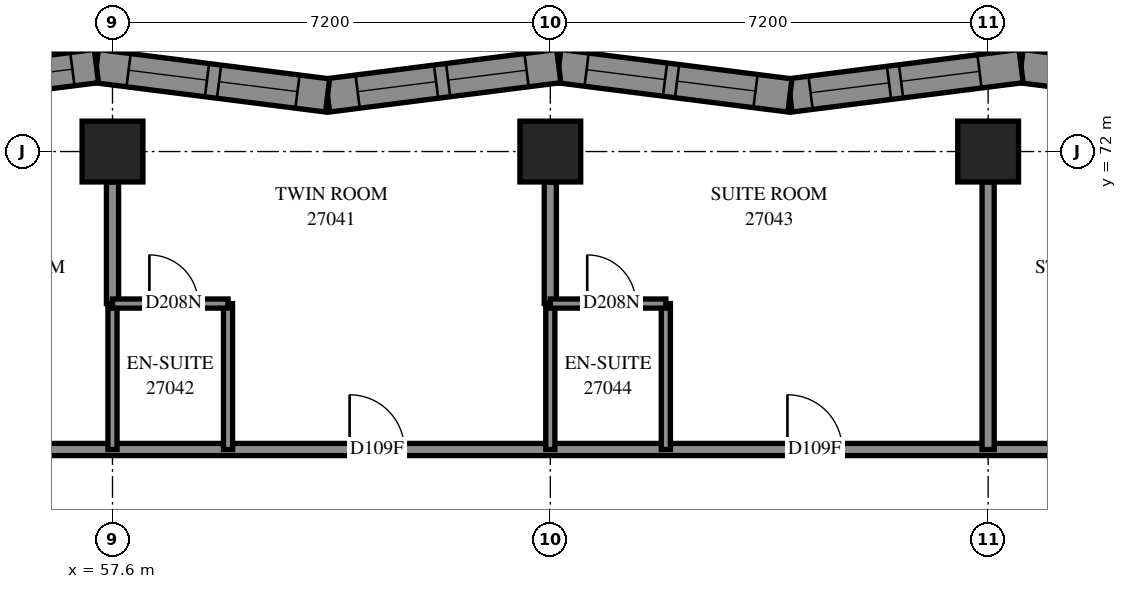
"""IFC4 building model, lengths in metres.
Left out: names, types, materials, properties, quantities, classifications, styles, units other than length and angle.
Written with IfcOpenShell. Run it as: python <this file> out.ifc"""

import sys

from ifc_helpers import new_model, si_unit, direction, frame, frame_2d, origin, origin_2d, place, context, subcontext, project, spatial, polyline, rectangle, outline, extrude, element, fill, save


model = new_model("IFC4")
c1 = context("Model", 3, precision=1e-05, world=origin(), true_north=direction((0.0, 1.0)))
c2 = subcontext(c1, "Body", "Model", "MODEL_VIEW")
j1 = project(units=[si_unit("LENGTHUNIT", "METRE"), si_unit("PLANEANGLEUNIT", "RADIAN")], contexts=[c1])
p1 = place(None, origin())
s1 = spatial("IfcSite", under=j1, at=p1, CompositionType="ELEMENT")
p2 = place(p1, origin())
s2 = spatial("IfcBuilding", under=s1, at=p2, CompositionType="ELEMENT")
p3 = place(p2, frame((0.0, 0.0, 101.6)))
s3 = spatial("IfcBuildingStorey", under=s2, at=p3, CompositionType="ELEMENT", Elevation=101.6)
for number, where, z_axis, x_axis in (
    (1, (57.6, 72.0, 0.0), (0.0, 0.0, 1.0), (1.0, 0.0, 0.0)),
    (2, (64.8, 72.0, 0.0), (0.0, 0.0, 1.0), (1.0, 0.0, 0.0)),
    (3, (72.0, 72.0, 0.0), (0.0, 0.0, 1.0), (1.0, 0.0, 0.0)),
):
    element("IfcColumn", number, at=place(p3, frame(where, z_axis=z_axis, x_axis=x_axis)), inside=s3, PredefinedType="COLUMN", context=c2, shape_type="SweptSolid", body=[
        extrude(rectangle(XDim=1.0, YDim=1.0, at=origin_2d()), origin(), (0.0, 0.0, 1.0), 3.1),
    ])
p4 = place(p3, frame((76.365, 72.92, 0.0), z_axis=(0.0, 0.0, 1.0), x_axis=(-0.9920579561, 0.1257816033, 0.0)))
e4 = element("IfcWall", 4, at=p4, inside=s3, PredefinedType="SOLIDWALL", context=c2, shape_type="SweptSolid", body=[
    extrude(outline(polyline([(0.056, -0.275), (3.888, -0.275), (3.819, 0.275), (-0.056, 0.275), (0.056, -0.275)])), origin(), (0.0, 0.0, 1.0), 3.1),
])
p5 = place(p4, frame((1.595, 0.0, 0.5)))
e5 = element("IfcOpeningElement", 5, at=p5, cuts=e4, PredefinedType="OPENING", context=c2, shape_type="SweptSolid", body=[
    extrude(rectangle(XDim=1.2, YDim=2.45, at=frame_2d((0.6, 1.225))), frame((0.0, 0.285, 0.0), z_axis=(0.0, -1.0, 0.0), x_axis=(1.0, 0.0, 0.0)), (0.0, 0.0, 1.0), 0.57),
])
p6 = place(p3, frame((72.542, 73.405, 0.0), z_axis=(0.0, 0.0, 1.0), x_axis=(-0.9920583495, -0.1257785003, 0.0)))
e6 = element("IfcWall", 6, at=p6, inside=s3, PredefinedType="SOLIDWALL", context=c2, shape_type="SweptSolid", body=[
    extrude(outline(polyline([(-0.035, -0.275), (3.797, -0.275), (3.867, 0.275), (0.035, 0.275), (-0.035, -0.275)])), origin(), (0.0, 0.0, 1.0), 3.1),
])
p7 = place(p6, frame((0.689, 0.0, 0.5)))
e7 = element("IfcOpeningElement", 7, at=p7, cuts=e6, PredefinedType="OPENING", context=c2, shape_type="SweptSolid", body=[
    extrude(rectangle(XDim=1.3, YDim=2.45, at=frame_2d((0.65, 1.225))), frame((0.0, 0.285, 0.0), z_axis=(0.0, -1.0, 0.0), x_axis=(1.0, 0.0, 0.0)), (0.0, 0.0, 1.0), 0.57),
])
p8 = place(p6, frame((2.189, 0.0, 0.5)))
e8 = element("IfcOpeningElement", 8, at=p8, cuts=e6, PredefinedType="OPENING", context=c2, shape_type="SweptSolid", body=[
    extrude(rectangle(XDim=1.3, YDim=2.45, at=frame_2d((0.65, 1.225))), frame((0.0, 0.285, 0.0), z_axis=(0.0, -1.0, 0.0), x_axis=(1.0, 0.0, 0.0)), (0.0, 0.0, 1.0), 0.57),
])
p9 = place(p3, frame((68.74, 72.923, 0.0), z_axis=(0.0, 0.0, 1.0), x_axis=(-0.9920583495, 0.1257785003, 0.0)))
e9 = element("IfcWall", 9, at=p9, inside=s3, PredefinedType="SOLIDWALL", context=c2, shape_type="SweptSolid", body=[
    extrude(outline(polyline([(0.035, -0.275), (3.867, -0.275), (3.797, 0.275), (-0.035, 0.275), (0.035, -0.275)])), origin(), (0.0, 0.0, 1.0), 3.1),
])
p10 = place(p9, frame((0.57, 0.0, 0.5)))
e10 = element("IfcOpeningElement", 10, at=p10, cuts=e9, PredefinedType="OPENING", context=c2, shape_type="SweptSolid", body=[
    extrude(rectangle(XDim=1.3, YDim=2.45, at=frame_2d((0.65, 1.225))), frame((0.0, 0.285, 0.0), z_axis=(0.0, -1.0, 0.0), x_axis=(1.0, 0.0, 0.0)), (0.0, 0.0, 1.0), 0.57),
])
p11 = place(p9, frame((2.07, 0.0, 0.5)))
e11 = element("IfcOpeningElement", 11, at=p11, cuts=e9, PredefinedType="OPENING", context=c2, shape_type="SweptSolid", body=[
    extrude(rectangle(XDim=1.3, YDim=2.45, at=frame_2d((0.65, 1.225))), frame((0.0, 0.285, 0.0), z_axis=(0.0, -1.0, 0.0), x_axis=(1.0, 0.0, 0.0)), (0.0, 0.0, 1.0), 0.57),
])
p12 = place(p3, frame((64.939, 73.405, 0.0), z_axis=(0.0, 0.0, 1.0), x_axis=(-0.9920583495, -0.1257785003, 0.0)))
e12 = element("IfcWall", 12, at=p12, inside=s3, PredefinedType="SOLIDWALL", context=c2, shape_type="SweptSolid", body=[
    extrude(outline(polyline([(-0.035, -0.275), (3.797, -0.275), (3.867, 0.275), (0.035, 0.275), (-0.035, -0.275)])), origin(), (0.0, 0.0, 1.0), 3.1),
])
p13 = place(p12, frame((0.533, 0.0, 0.5)))
e13 = element("IfcOpeningElement", 13, at=p13, cuts=e12, PredefinedType="OPENING", context=c2, shape_type="SweptSolid", body=[
    extrude(rectangle(XDim=1.3, YDim=2.45, at=frame_2d((0.65, 1.225))), frame((0.0, 0.285, 0.0), z_axis=(0.0, -1.0, 0.0), x_axis=(1.0, 0.0, 0.0)), (0.0, 0.0, 1.0), 0.57),
])
p14 = place(p12, frame((2.034, 0.0, 0.5)))
e14 = element("IfcOpeningElement", 14, at=p14, cuts=e12, PredefinedType="OPENING", context=c2, shape_type="SweptSolid", body=[
    extrude(rectangle(XDim=1.3, YDim=2.45, at=frame_2d((0.65, 1.225))), frame((0.0, 0.285, 0.0), z_axis=(0.0, -1.0, 0.0), x_axis=(1.0, 0.0, 0.0)), (0.0, 0.0, 1.0), 0.57),
])
p15 = place(p3, frame((61.137, 72.923, 0.0), z_axis=(0.0, 0.0, 1.0), x_axis=(-0.9920583495, 0.1257785003, 0.0)))
e15 = element("IfcWall", 15, at=p15, inside=s3, PredefinedType="SOLIDWALL", context=c2, shape_type="SweptSolid", body=[
    extrude(outline(polyline([(0.035, -0.275), (3.867, -0.275), (3.797, 0.275), (-0.035, 0.275), (0.035, -0.275)])), origin(), (0.0, 0.0, 1.0), 3.1),
])
p16 = place(p15, frame((0.499, 0.0, 0.5)))
e16 = element("IfcOpeningElement", 16, at=p16, cuts=e15, PredefinedType="OPENING", context=c2, shape_type="SweptSolid", body=[
    extrude(rectangle(XDim=1.3, YDim=2.45, at=frame_2d((0.65, 1.225))), frame((0.0, 0.285, 0.0), z_axis=(0.0, -1.0, 0.0), x_axis=(1.0, 0.0, 0.0)), (0.0, 0.0, 1.0), 0.57),
])
p17 = place(p15, frame((1.999, 0.0, 0.5)))
e17 = element("IfcOpeningElement", 17, at=p17, cuts=e15, PredefinedType="OPENING", context=c2, shape_type="SweptSolid", body=[
    extrude(rectangle(XDim=1.3, YDim=2.45, at=frame_2d((0.65, 1.225))), frame((0.0, 0.285, 0.0), z_axis=(0.0, -1.0, 0.0), x_axis=(1.0, 0.0, 0.0)), (0.0, 0.0, 1.0), 0.57),
])
p18 = place(p3, frame((57.335, 73.405, 0.0), z_axis=(0.0, 0.0, 1.0), x_axis=(-0.9920587623, -0.1257752442, 0.0)))
e18 = element("IfcWall", 18, at=p18, inside=s3, PredefinedType="SOLIDWALL", context=c2, shape_type="SweptSolid", body=[
    extrude(outline(polyline([(-0.035, -0.275), (3.797, -0.275), (3.867, 0.275), (0.035, 0.275), (-0.035, -0.275)])), origin(), (0.0, 0.0, 1.0), 3.1),
])
p19 = place(p18, frame((0.398, 0.0, 0.5)))
e19 = element("IfcOpeningElement", 19, at=p19, cuts=e18, PredefinedType="OPENING", context=c2, shape_type="SweptSolid", body=[
    extrude(rectangle(XDim=1.3, YDim=2.45, at=frame_2d((0.65, 1.225))), frame((0.0, 0.285, 0.0), z_axis=(0.0, -1.0, 0.0), x_axis=(1.0, 0.0, 0.0)), (0.0, 0.0, 1.0), 0.57),
])
p20 = place(p18, frame((1.898, 0.0, 0.5)))
e20 = element("IfcOpeningElement", 20, at=p20, cuts=e18, PredefinedType="OPENING", context=c2, shape_type="SweptSolid", body=[
    extrude(rectangle(XDim=1.3, YDim=2.45, at=frame_2d((0.65, 1.225))), frame((0.0, 0.285, 0.0), z_axis=(0.0, -1.0, 0.0), x_axis=(1.0, 0.0, 0.0)), (0.0, 0.0, 1.0), 0.57),
])
p21 = place(p3, frame((55.3, 67.1, 0.0), z_axis=(0.0, 0.0, 1.0), x_axis=(1.0, 0.0, 0.0)))
e21 = element("IfcWall", 21, at=p21, inside=s3, PredefinedType="PARTITIONING", context=c2, shape_type="SweptSolid", body=[
    extrude(rectangle(XDim=19.0, YDim=0.2, at=frame_2d((9.5, 0.0))), origin(), (0.0, 0.0, 1.0), 3.1),
])
p22 = place(p21, frame((6.199, 0.0, 0.0)))
e22 = element("IfcOpeningElement", 22, at=p22, cuts=e21, PredefinedType="OPENING", context=c2, shape_type="SweptSolid", body=[
    extrude(rectangle(XDim=0.9, YDim=2.1, at=frame_2d((0.45, 1.05))), frame((0.0, 0.11, 0.0), z_axis=(0.0, -1.0, 0.0), x_axis=(1.0, 0.0, 0.0)), (0.0, 0.0, 1.0), 0.22),
])
p23 = place(p21, frame((13.399, 0.0, 0.0)))
e23 = element("IfcOpeningElement", 23, at=p23, cuts=e21, PredefinedType="OPENING", context=c2, shape_type="SweptSolid", body=[
    extrude(rectangle(XDim=0.9, YDim=2.1, at=frame_2d((0.45, 1.05))), frame((0.0, 0.11, 0.0), z_axis=(0.0, -1.0, 0.0), x_axis=(1.0, 0.0, 0.0)), (0.0, 0.0, 1.0), 0.22),
])
p24 = place(p3, frame((72.0, 67.1, 0.0), z_axis=(0.0, 0.0, 1.0), x_axis=(0.0, 1.0, 0.0)))
e24 = element("IfcWall", 24, at=p24, inside=s3, PredefinedType="PARTITIONING", context=c2, shape_type="SweptSolid", body=[
    extrude(rectangle(XDim=4.4, YDim=0.2, at=frame_2d((2.2, 0.0))), origin(), (0.0, 0.0, 1.0), 3.1),
])
for number, where, z_axis, x_axis in (
    (25, (59.5, 67.1, 0.0), (0.0, 0.0, 1.0), (0.0, 1.0, 0.0)),
    (26, (57.6, 67.1, 0.0), (0.0, 0.0, 1.0), (0.0, 1.0, 0.0)),
    (27, (64.8, 67.1, 0.0), (0.0, 0.0, 1.0), (0.0, 1.0, 0.0)),
    (28, (66.7, 67.1, 0.0), (0.0, 0.0, 1.0), (0.0, 1.0, 0.0)),
):
    element("IfcWall", number, at=place(p3, frame(where, z_axis=z_axis, x_axis=x_axis)), inside=s3, PredefinedType="PARTITIONING", context=c2, shape_type="SweptSolid", body=[
        extrude(rectangle(XDim=2.4, YDim=0.15, at=frame_2d((1.2, 0.0))), origin(), (0.0, 0.0, 1.0), 3.1),
    ])
for number, where, z_axis, x_axis in (
    (29, (57.6, 69.5, 0.0), (0.0, 0.0, 1.0), (0.0, 1.0, 0.0)),
    (30, (64.8, 69.5, 0.0), (0.0, 0.0, 1.0), (0.0, 1.0, 0.0)),
):
    element("IfcWall", number, at=place(p3, frame(where, z_axis=z_axis, x_axis=x_axis)), inside=s3, PredefinedType="PARTITIONING", context=c2, shape_type="SweptSolid", body=[
        extrude(rectangle(XDim=2.0, YDim=0.2, at=frame_2d((1.0, 0.0))), origin(), (0.0, 0.0, 1.0), 3.1),
    ])
p25 = place(p3, frame((64.8, 69.5, 0.0), z_axis=(0.0, 0.0, 1.0), x_axis=(1.0, 0.0, 0.0)))
e31 = element("IfcWall", 31, at=p25, inside=s3, PredefinedType="PARTITIONING", context=c2, shape_type="SweptSolid", body=[
    extrude(rectangle(XDim=1.9, YDim=0.15, at=frame_2d((0.95, 0.0))), origin(), (0.0, 0.0, 1.0), 3.1),
])
p26 = place(p25, frame((0.607, 0.0, 0.0)))
e32 = element("IfcOpeningElement", 32, at=p26, cuts=e31, PredefinedType="OPENING", context=c2, shape_type="SweptSolid", body=[
    extrude(rectangle(XDim=0.8, YDim=2.1, at=frame_2d((0.4, 1.05))), frame((0.0, 0.085, 0.0), z_axis=(0.0, -1.0, 0.0), x_axis=(1.0, 0.0, 0.0)), (0.0, 0.0, 1.0), 0.17),
])
p27 = place(p3, frame((57.6, 69.5, 0.0), z_axis=(0.0, 0.0, 1.0), x_axis=(1.0, 0.0, 0.0)))
e33 = element("IfcWall", 33, at=p27, inside=s3, PredefinedType="PARTITIONING", context=c2, shape_type="SweptSolid", body=[
    extrude(rectangle(XDim=1.9, YDim=0.15, at=frame_2d((0.95, 0.0))), origin(), (0.0, 0.0, 1.0), 3.1),
])
p28 = place(p27, frame((0.607, 0.0, 0.0)))
e34 = element("IfcOpeningElement", 34, at=p28, cuts=e33, PredefinedType="OPENING", context=c2, shape_type="SweptSolid", body=[
    extrude(rectangle(XDim=0.8, YDim=2.1, at=frame_2d((0.4, 1.05))), frame((0.0, 0.085, 0.0), z_axis=(0.0, -1.0, 0.0), x_axis=(1.0, 0.0, 0.0)), (0.0, 0.0, 1.0), 0.17),
])
p29 = place(p7, origin())
e35 = element("IfcWindow", 35, at=p29, inside=s3, PartitioningType="SINGLE_PANEL", PredefinedType="WINDOW", context=c2, shape_type="SweptSolid", body=[
    extrude(rectangle(XDim=1.3, YDim=2.45, at=frame_2d((0.65, 1.225))), frame((0.0, 0.155, 0.0), z_axis=(0.0, -1.0, 0.0), x_axis=(1.0, 0.0, 0.0)), (0.0, 0.0, 1.0), 0.06),
])
fill(e7, e35)
p30 = place(p8, origin())
e36 = element("IfcWindow", 36, at=p30, inside=s3, PartitioningType="SINGLE_PANEL", PredefinedType="WINDOW", context=c2, shape_type="SweptSolid", body=[
    extrude(rectangle(XDim=1.3, YDim=2.45, at=frame_2d((0.65, 1.225))), frame((0.0, 0.155, 0.0), z_axis=(0.0, -1.0, 0.0), x_axis=(1.0, 0.0, 0.0)), (0.0, 0.0, 1.0), 0.06),
])
fill(e8, e36)
p31 = place(p10, origin())
e37 = element("IfcWindow", 37, at=p31, inside=s3, PartitioningType="SINGLE_PANEL", PredefinedType="WINDOW", context=c2, shape_type="SweptSolid", body=[
    extrude(rectangle(XDim=1.3, YDim=2.45, at=frame_2d((0.65, 1.225))), frame((0.0, 0.155, 0.0), z_axis=(0.0, -1.0, 0.0), x_axis=(1.0, 0.0, 0.0)), (0.0, 0.0, 1.0), 0.06),
])
fill(e10, e37)
p32 = place(p11, origin())
e38 = element("IfcWindow", 38, at=p32, inside=s3, PartitioningType="SINGLE_PANEL", PredefinedType="WINDOW", context=c2, shape_type="SweptSolid", body=[
    extrude(rectangle(XDim=1.3, YDim=2.45, at=frame_2d((0.65, 1.225))), frame((0.0, 0.155, 0.0), z_axis=(0.0, -1.0, 0.0), x_axis=(1.0, 0.0, 0.0)), (0.0, 0.0, 1.0), 0.06),
])
fill(e11, e38)
p33 = place(p13, origin())
e39 = element("IfcWindow", 39, at=p33, inside=s3, PartitioningType="SINGLE_PANEL", PredefinedType="WINDOW", context=c2, shape_type="SweptSolid", body=[
    extrude(rectangle(XDim=1.3, YDim=2.45, at=frame_2d((0.65, 1.225))), frame((0.0, 0.155, 0.0), z_axis=(0.0, -1.0, 0.0), x_axis=(1.0, 0.0, 0.0)), (0.0, 0.0, 1.0), 0.06),
])
fill(e13, e39)
p34 = place(p14, origin())
e40 = element("IfcWindow", 40, at=p34, inside=s3, PartitioningType="SINGLE_PANEL", PredefinedType="WINDOW", context=c2, shape_type="SweptSolid", body=[
    extrude(rectangle(XDim=1.3, YDim=2.45, at=frame_2d((0.65, 1.225))), frame((0.0, 0.155, 0.0), z_axis=(0.0, -1.0, 0.0), x_axis=(1.0, 0.0, 0.0)), (0.0, 0.0, 1.0), 0.06),
])
fill(e14, e40)
p35 = place(p16, origin())
e41 = element("IfcWindow", 41, at=p35, inside=s3, PartitioningType="SINGLE_PANEL", PredefinedType="WINDOW", context=c2, shape_type="SweptSolid", body=[
    extrude(rectangle(XDim=1.3, YDim=2.45, at=frame_2d((0.65, 1.225))), frame((0.0, 0.155, 0.0), z_axis=(0.0, -1.0, 0.0), x_axis=(1.0, 0.0, 0.0)), (0.0, 0.0, 1.0), 0.06),
])
fill(e16, e41)
p36 = place(p17, origin())
e42 = element("IfcWindow", 42, at=p36, inside=s3, PartitioningType="SINGLE_PANEL", PredefinedType="WINDOW", context=c2, shape_type="SweptSolid", body=[
    extrude(rectangle(XDim=1.3, YDim=2.45, at=frame_2d((0.65, 1.225))), frame((0.0, 0.155, 0.0), z_axis=(0.0, -1.0, 0.0), x_axis=(1.0, 0.0, 0.0)), (0.0, 0.0, 1.0), 0.06),
])
fill(e17, e42)
p37 = place(p19, origin())
e43 = element("IfcWindow", 43, at=p37, inside=s3, PartitioningType="SINGLE_PANEL", PredefinedType="WINDOW", context=c2, shape_type="SweptSolid", body=[
    extrude(rectangle(XDim=1.3, YDim=2.45, at=frame_2d((0.65, 1.225))), frame((0.0, 0.155, 0.0), z_axis=(0.0, -1.0, 0.0), x_axis=(1.0, 0.0, 0.0)), (0.0, 0.0, 1.0), 0.06),
])
fill(e19, e43)
p38 = place(p22, origin())
e44 = element("IfcDoor", 44, at=p38, inside=s3, OperationType="SINGLE_SWING_RIGHT", PredefinedType="DOOR", context=c2, shape_type="SweptSolid", body=[
    extrude(rectangle(XDim=0.9, YDim=2.1, at=frame_2d((0.45, 1.05))), frame((0.0, 0.025, 0.0), z_axis=(0.0, -1.0, 0.0), x_axis=(1.0, 0.0, 0.0)), (0.0, 0.0, 1.0), 0.05),
])
fill(e22, e44)
p39 = place(p28, origin())
e45 = element("IfcDoor", 45, at=p39, inside=s3, OperationType="SINGLE_SWING_RIGHT", PredefinedType="DOOR", context=c2, shape_type="SweptSolid", body=[
    extrude(rectangle(XDim=0.8, YDim=2.1, at=frame_2d((0.4, 1.05))), frame((0.0, 0.025, 0.0), z_axis=(0.0, -1.0, 0.0), x_axis=(1.0, 0.0, 0.0)), (0.0, 0.0, 1.0), 0.05),
])
fill(e34, e45)
p40 = place(p23, origin())
e46 = element("IfcDoor", 46, at=p40, inside=s3, OperationType="SINGLE_SWING_RIGHT", PredefinedType="DOOR", context=c2, shape_type="SweptSolid", body=[
    extrude(rectangle(XDim=0.9, YDim=2.1, at=frame_2d((0.45, 1.05))), frame((0.0, 0.025, 0.0), z_axis=(0.0, -1.0, 0.0), x_axis=(1.0, 0.0, 0.0)), (0.0, 0.0, 1.0), 0.05),
])
fill(e23, e46)
p41 = place(p26, origin())
e47 = element("IfcDoor", 47, at=p41, inside=s3, OperationType="SINGLE_SWING_RIGHT", PredefinedType="DOOR", context=c2, shape_type="SweptSolid", body=[
    extrude(rectangle(XDim=0.8, YDim=2.1, at=frame_2d((0.4, 1.05))), frame((0.0, 0.025, 0.0), z_axis=(0.0, -1.0, 0.0), x_axis=(1.0, 0.0, 0.0)), (0.0, 0.0, 1.0), 0.05),
])
fill(e32, e47)
save(model, sys.argv[1])
